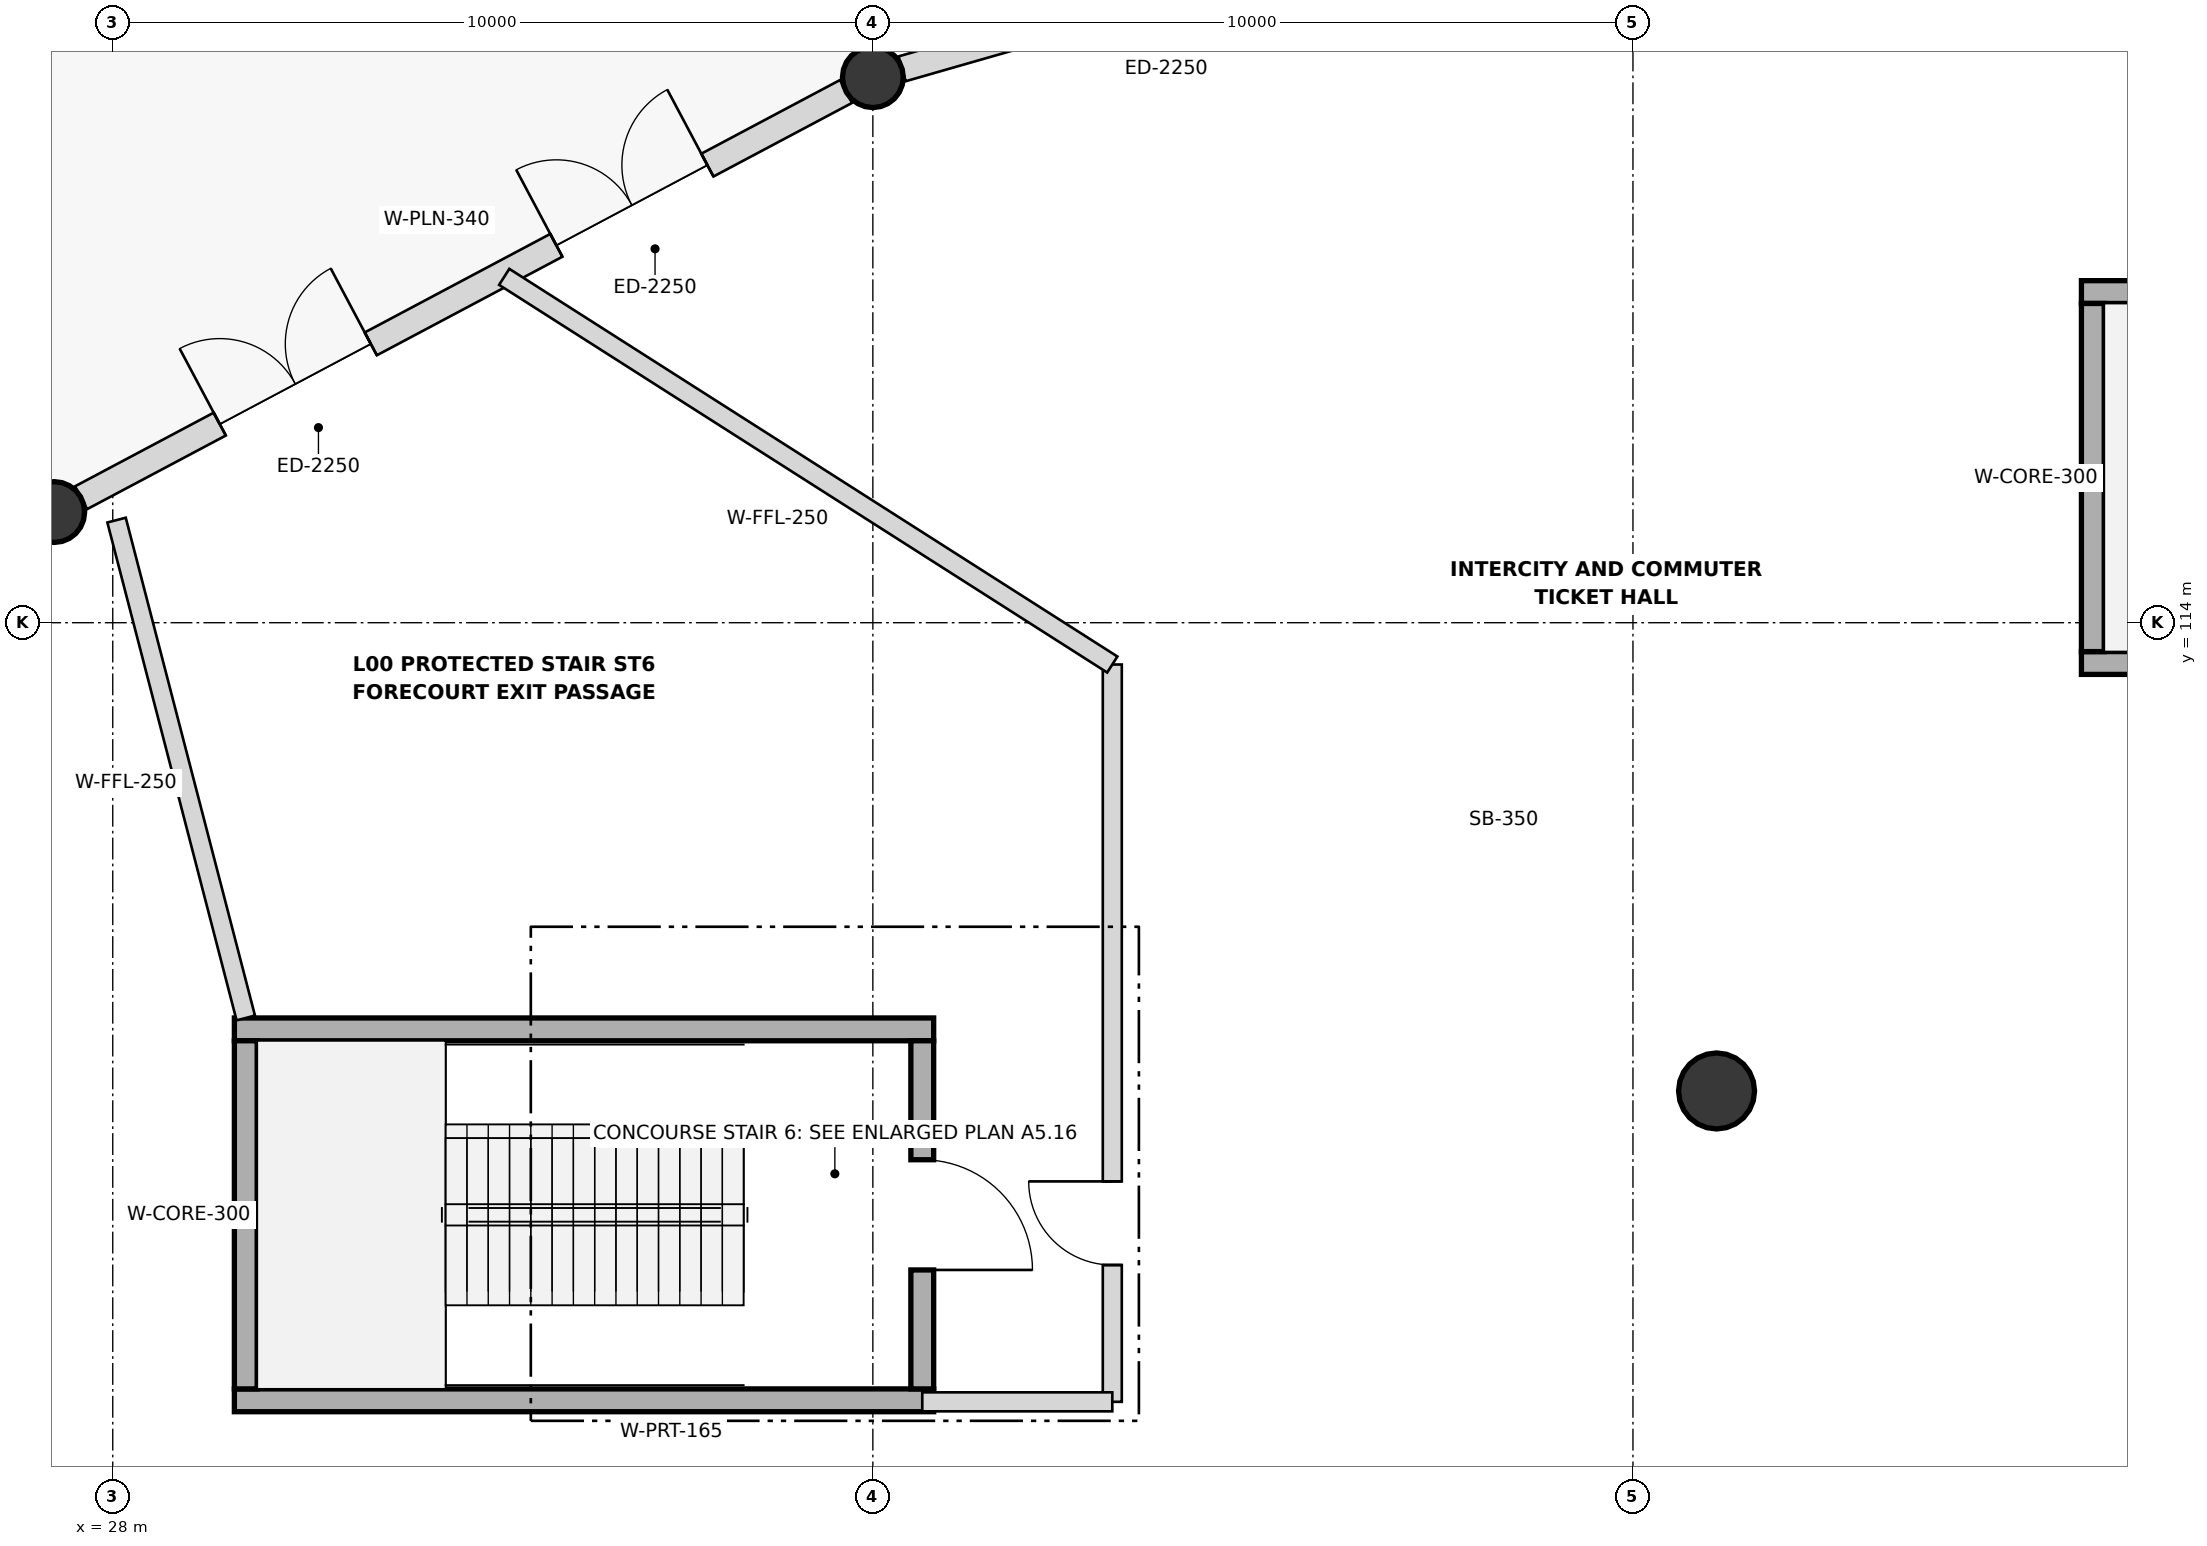
"""IFC4 building model, lengths in metres.
Left out: names, types, materials, properties, quantities, classifications, styles, units other than length and angle.
Written with IfcOpenShell. Run it as: python <this file> out.ifc"""

import sys

from ifc_helpers import new_model, si_unit, direction, frame, frame_2d, origin, origin_2d, place, context, subcontext, project, spatial, rectangle, circle, extrude, element, fill, save


model = new_model("IFC4")
c1 = context("Model", 3, precision=1e-05, world=origin(), true_north=direction((0.0, 1.0)))
c2 = subcontext(c1, "Body", "Model", "MODEL_VIEW")
j1 = project(units=[si_unit("LENGTHUNIT", "METRE"), si_unit("PLANEANGLEUNIT", "RADIAN")], contexts=[c1])
p1 = place(None, origin())
s1 = spatial("IfcSite", under=j1, at=p1, CompositionType="ELEMENT")
p2 = place(p1, origin())
s2 = spatial("IfcBuilding", under=s1, at=p2, CompositionType="ELEMENT")
p3 = place(p2, origin())
s3 = spatial("IfcBuildingStorey", under=s2, at=p3, CompositionType="ELEMENT", Elevation=0.0)
for number, where, z_axis, x_axis in (
    (1, (38.0, 121.177, 0.0), (0.0, 0.0, 1.0), (1.0, 0.0, 0.0)),
    (2, (27.23, 115.456, 0.0), (0.0, 0.0, 1.0), (1.0, 0.0, 0.0)),
):
    element("IfcColumn", number, at=place(p3, frame(where, z_axis=z_axis, x_axis=x_axis)), inside=s3, PredefinedType="COLUMN", context=c2, shape_type="SweptSolid", body=[
        extrude(circle(Radius=0.4, at=origin_2d()), origin(), (0.0, 0.0, 1.0), 5.4),
    ])
p4 = place(p3, frame((49.1, 107.84, 0.0), z_axis=(0.0, 0.0, 1.0), x_axis=(1.0, 0.0, 0.0)))
e3 = element("IfcColumn", 3, at=p4, inside=s3, PredefinedType="COLUMN", context=c2, shape_type="SweptSolid", body=[
    extrude(circle(Radius=0.5, at=origin_2d()), origin(), (0.0, 0.0, 1.0), 5.4),
])
p5 = place(p3, frame((38.385, 121.287, 0.0), z_axis=(0.0, 0.0, 1.0), x_axis=(0.9612465972, 0.275690005934, 0.0)))
e4 = element("IfcWall", 4, at=p5, inside=s3, PredefinedType="SOLIDWALL", context=c2, shape_type="SweptSolid", body=[
    extrude(rectangle(XDim=12.246, YDim=0.34, at=frame_2d((6.123, 0.0))), origin(), (0.0, 0.0, 1.0), 4.54),
])
p6 = place(p5, frame((2.304, 0.0, 0.0)))
e5 = element("IfcOpeningElement", 5, at=p6, cuts=e4, PredefinedType="OPENING", context=c2, shape_type="SweptSolid", body=[
    extrude(rectangle(XDim=2.25, YDim=2.5, at=frame_2d((1.125, 1.25))), frame((0.0, 0.18, 0.0), z_axis=(0.0, -1.0, 0.0), x_axis=(1.0, 0.0, 0.0)), (0.0, 0.0, 1.0), 0.36),
])
p7 = place(p5, frame((7.692, 0.0, 0.0)))
e6 = element("IfcOpeningElement", 6, at=p7, cuts=e4, PredefinedType="OPENING", context=c2, shape_type="SweptSolid", body=[
    extrude(rectangle(XDim=2.25, YDim=2.5, at=frame_2d((1.125, 1.25))), frame((0.0, 0.18, 0.0), z_axis=(0.0, -1.0, 0.0), x_axis=(1.0, 0.0, 0.0)), (0.0, 0.0, 1.0), 0.36),
])
p8 = place(p3, frame((27.583, 115.644, 0.0), z_axis=(0.0, 0.0, 1.0), x_axis=(0.883170637758, 0.46905183573, 0.0)))
e7 = element("IfcWall", 7, at=p8, inside=s3, PredefinedType="SOLIDWALL", context=c2, shape_type="SweptSolid", body=[
    extrude(rectangle(XDim=11.395, YDim=0.34, at=frame_2d((5.698, 0.0))), origin(), (0.0, 0.0, 1.0), 4.54),
])
p9 = place(p8, frame((2.066, 0.0, 0.0)))
e8 = element("IfcOpeningElement", 8, at=p9, cuts=e7, PredefinedType="OPENING", context=c2, shape_type="SweptSolid", body=[
    extrude(rectangle(XDim=2.25, YDim=2.5, at=frame_2d((1.125, 1.25))), frame((0.0, 0.18, 0.0), z_axis=(0.0, -1.0, 0.0), x_axis=(1.0, 0.0, 0.0)), (0.0, 0.0, 1.0), 0.36),
])
p10 = place(p8, frame((7.08, 0.0, 0.0)))
e9 = element("IfcOpeningElement", 9, at=p10, cuts=e7, PredefinedType="OPENING", context=c2, shape_type="SweptSolid", body=[
    extrude(rectangle(XDim=2.25, YDim=2.5, at=frame_2d((1.125, 1.25))), frame((0.0, 0.18, 0.0), z_axis=(0.0, -1.0, 0.0), x_axis=(1.0, 0.0, 0.0)), (0.0, 0.0, 1.0), 0.36),
])
for number, where, z_axis, x_axis in (
    (10, (63.1, 113.47, 0.0), (0.0, 0.0, 1.0), (-1.0, 0.0, 0.0)),
    (11, (53.9, 118.35, 0.0), (0.0, 0.0, 1.0), (1.0, 0.0, 0.0)),
):
    element("IfcWall", number, at=place(p3, frame(where, z_axis=z_axis, x_axis=x_axis)), inside=s3, PredefinedType="SHEAR", context=c2, shape_type="SweptSolid", body=[
        extrude(rectangle(XDim=9.2, YDim=0.3, at=frame_2d((4.6, 0.0))), origin(), (0.0, 0.0, 1.0), 5.4),
    ])
p11 = place(p3, frame((54.05, 113.62, 0.0), z_axis=(0.0, 0.0, 1.0), x_axis=(0.0, 1.0, 0.0)))
e12 = element("IfcWall", 12, at=p11, inside=s3, PredefinedType="SHEAR", context=c2, shape_type="SweptSolid", body=[
    extrude(rectangle(XDim=4.58, YDim=0.3, at=frame_2d((2.29, 0.0))), origin(), (0.0, 0.0, 1.0), 5.4),
])
for number, where, z_axis, x_axis in (
    (13, (38.8, 103.77, 0.0), (0.0, 0.0, 1.0), (-1.0, 0.0, 0.0)),
    (14, (29.6, 108.65, 0.0), (0.0, 0.0, 1.0), (1.0, 0.0, 0.0)),
):
    element("IfcWall", number, at=place(p3, frame(where, z_axis=z_axis, x_axis=x_axis)), inside=s3, PredefinedType="SHEAR", context=c2, shape_type="SweptSolid", body=[
        extrude(rectangle(XDim=9.2, YDim=0.3, at=frame_2d((4.6, 0.0))), origin(), (0.0, 0.0, 1.0), 5.4),
    ])
p12 = place(p3, frame((38.65, 108.5, 0.0), z_axis=(0.0, 0.0, 1.0), x_axis=(0.0, -1.0, 0.0)))
e15 = element("IfcWall", 15, at=p12, inside=s3, PredefinedType="SHEAR", context=c2, shape_type="SweptSolid", body=[
    extrude(rectangle(XDim=4.58, YDim=0.3, at=frame_2d((2.29, 0.0))), origin(), (0.0, 0.0, 1.0), 5.4),
])
p13 = place(p12, frame((1.565, 0.0, 0.0)))
e16 = element("IfcOpeningElement", 16, at=p13, cuts=e15, PredefinedType="OPENING", context=c2, shape_type="SweptSolid", body=[
    extrude(rectangle(XDim=1.45, YDim=2.2, at=frame_2d((0.725, 1.1))), frame((0.0, 0.16, 0.0), z_axis=(0.0, -1.0, 0.0), x_axis=(1.0, 0.0, 0.0)), (0.0, 0.0, 1.0), 0.32),
])
p14 = place(p3, frame((29.75, 103.92, 0.0), z_axis=(0.0, 0.0, 1.0), x_axis=(0.0, 1.0, 0.0)))
e17 = element("IfcWall", 17, at=p14, inside=s3, PredefinedType="SHEAR", context=c2, shape_type="SweptSolid", body=[
    extrude(rectangle(XDim=4.58, YDim=0.3, at=frame_2d((2.29, 0.0))), origin(), (0.0, 0.0, 1.0), 5.4),
])
p15 = place(p3, frame((41.15, 103.75, 0.0), z_axis=(0.0, 0.0, 1.0), x_axis=(0.0, 1.0, 0.0)))
e18 = element("IfcWall", 18, at=p15, inside=s3, PredefinedType="PARTITIONING", context=c2, shape_type="SweptSolid", body=[
    extrude(rectangle(XDim=9.7, YDim=0.25, at=frame_2d((4.85, 0.0))), origin(), (0.0, 0.0, 1.0), 4.1),
])
p16 = place(p15, frame((1.8, 0.0, 0.0)))
e19 = element("IfcOpeningElement", 19, at=p16, cuts=e18, PredefinedType="OPENING", context=c2, shape_type="SweptSolid", body=[
    extrude(rectangle(XDim=1.1, YDim=2.15, at=frame_2d((0.55, 1.075))), frame((0.0, 0.135, 0.0), z_axis=(0.0, -1.0, 0.0), x_axis=(1.0, 0.0, 0.0)), (0.0, 0.0, 1.0), 0.27),
])
p17 = place(p3, frame((41.15, 113.45, 0.0), z_axis=(0.0, 0.0, 1.0), x_axis=(-0.843222532273, 0.537564657568, 0.0)))
e20 = element("IfcWall", 20, at=p17, inside=s3, PredefinedType="PARTITIONING", context=c2, shape_type="SweptSolid", body=[
    extrude(rectangle(XDim=9.487, YDim=0.25, at=frame_2d((4.744, 0.0))), origin(), (0.0, 0.0, 1.0), 4.1),
])
p18 = place(p3, frame((29.75, 108.8, 0.0), z_axis=(0.0, 0.0, 1.0), x_axis=(-0.251210058237, 0.967932594058, 0.0)))
e21 = element("IfcWall", 21, at=p18, inside=s3, PredefinedType="PARTITIONING", context=c2, shape_type="SweptSolid", body=[
    extrude(rectangle(XDim=6.767, YDim=0.25, at=frame_2d((3.384, 0.0))), origin(), (0.0, 0.0, 1.0), 4.1),
])
p19 = place(p3, frame((38.65, 103.75, 0.0), z_axis=(0.0, 0.0, 1.0), x_axis=(1.0, 0.0, 0.0)))
e22 = element("IfcWall", 22, at=p19, inside=s3, PredefinedType="PARTITIONING", context=c2, shape_type="SweptSolid", body=[
    extrude(rectangle(XDim=2.5, YDim=0.25, at=frame_2d((1.25, 0.0))), origin(), (0.0, 0.0, 1.0), 4.1),
])
p20 = place(p9, origin())
e23 = element("IfcDoor", 23, at=p20, inside=s3, OperationType="DOUBLE_DOOR_SINGLE_SWING", PredefinedType="DOOR", context=c2, shape_type="SweptSolid", body=[
    extrude(rectangle(XDim=2.25, YDim=2.5, at=frame_2d((1.125, 1.25))), frame((0.0, 0.025, 0.0), z_axis=(0.0, -1.0, 0.0), x_axis=(1.0, 0.0, 0.0)), (0.0, 0.0, 1.0), 0.05),
])
fill(e8, e23)
p21 = place(p10, origin())
e24 = element("IfcDoor", 24, at=p21, inside=s3, OperationType="DOUBLE_DOOR_SINGLE_SWING", PredefinedType="DOOR", context=c2, shape_type="SweptSolid", body=[
    extrude(rectangle(XDim=2.25, YDim=2.5, at=frame_2d((1.125, 1.25))), frame((0.0, 0.025, 0.0), z_axis=(0.0, -1.0, 0.0), x_axis=(1.0, 0.0, 0.0)), (0.0, 0.0, 1.0), 0.05),
])
fill(e9, e24)
p22 = place(p13, origin())
e25 = element("IfcDoor", 25, at=p22, inside=s3, OperationType="SINGLE_SWING_RIGHT", PredefinedType="DOOR", context=c2, shape_type="SweptSolid", body=[
    extrude(rectangle(XDim=1.45, YDim=2.2, at=frame_2d((0.725, 1.1))), frame((0.0, 0.025, 0.0), z_axis=(0.0, -1.0, 0.0), x_axis=(1.0, 0.0, 0.0)), (0.0, 0.0, 1.0), 0.05),
])
fill(e16, e25)
p23 = place(p16, origin())
e26 = element("IfcDoor", 26, at=p23, inside=s3, OperationType="SINGLE_SWING_RIGHT", PredefinedType="DOOR", context=c2, shape_type="SweptSolid", body=[
    extrude(rectangle(XDim=1.1, YDim=2.15, at=frame_2d((0.55, 1.075))), frame((0.0, 0.025, 0.0), z_axis=(0.0, -1.0, 0.0), x_axis=(1.0, 0.0, 0.0)), (0.0, 0.0, 1.0), 0.05),
])
fill(e19, e26)
save(model, sys.argv[1])
